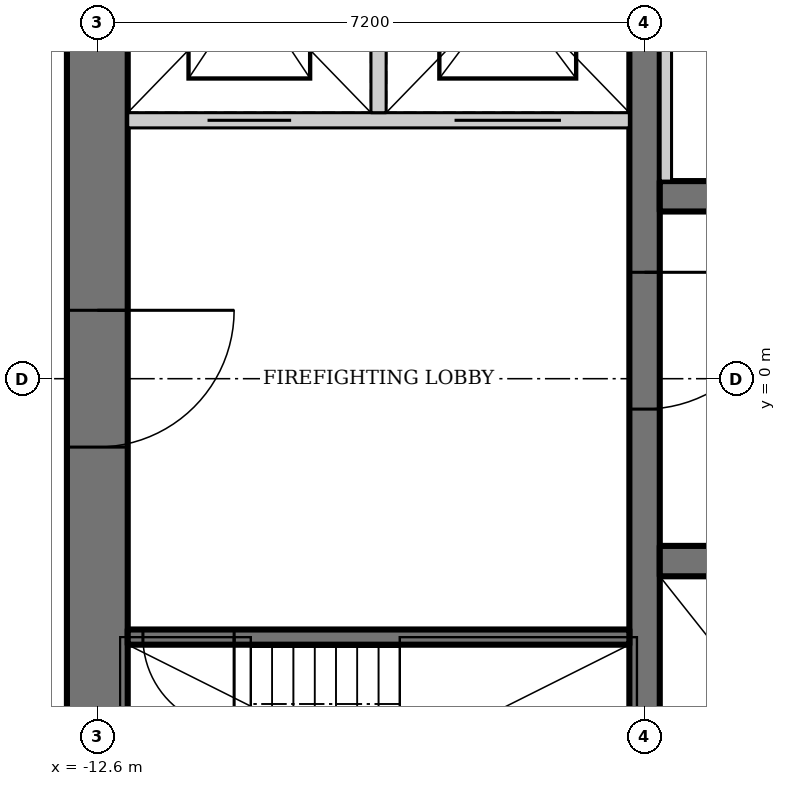
"""IFC4 building model, lengths in metres.
Left out: names, types, materials, properties, quantities, classifications, styles, units other than length and angle.
Written with IfcOpenShell. Run it as: python <this file> out.ifc"""

import sys

from ifc_helpers import new_model, si_unit, direction, frame, frame_2d, origin, place, context, subcontext, project, spatial, rectangle, extrude, element, fill, save


model = new_model("IFC4")
c1 = context("Model", 3, precision=1e-05, world=origin(), true_north=direction((0.0, 1.0)))
c2 = subcontext(c1, "Body", "Model", "MODEL_VIEW")
j1 = project(units=[si_unit("LENGTHUNIT", "METRE"), si_unit("PLANEANGLEUNIT", "RADIAN")], contexts=[c1])
p1 = place(None, origin())
s1 = spatial("IfcSite", under=j1, at=p1, CompositionType="ELEMENT")
p2 = place(p1, origin())
s2 = spatial("IfcBuilding", under=s1, at=p2, CompositionType="ELEMENT")
p3 = place(p2, frame((0.0, 0.0, 279.4)))
s3 = spatial("IfcBuildingStorey", under=s2, at=p3, CompositionType="ELEMENT", Elevation=279.4)
p4 = place(p3, frame((-12.6, 11.0, 0.0), z_axis=(0.0, 0.0, 1.0), x_axis=(0.0, -1.0, 0.0)))
e1 = element("IfcWall", 1, at=p4, inside=s3, PredefinedType="SHEAR", context=c2, shape_type="SweptSolid", body=[
    extrude(rectangle(XDim=22.0, YDim=0.8, at=frame_2d((11.0, 0.0))), origin(), (0.0, 0.0, 1.0), 5.0),
])
p5 = place(p4, frame((10.1, 0.0, 0.0)))
e2 = element("IfcOpeningElement", 2, at=p5, cuts=e1, PredefinedType="OPENING", context=c2, shape_type="SweptSolid", body=[
    extrude(rectangle(XDim=1.8, YDim=2.1, at=frame_2d((0.9, 1.05))), frame((0.0, 0.41, 0.0), z_axis=(0.0, -1.0, 0.0), x_axis=(1.0, 0.0, 0.0)), (0.0, 0.0, 1.0), 0.82),
])
p6 = place(p3, frame((-5.4, 7.8, 0.0), z_axis=(0.0, 0.0, 1.0), x_axis=(0.0, -1.0, 0.0)))
e3 = element("IfcWall", 3, at=p6, inside=s3, PredefinedType="SHEAR", context=c2, shape_type="SweptSolid", body=[
    extrude(rectangle(XDim=14.6, YDim=0.4, at=frame_2d((7.3, 0.0))), origin(), (0.0, 0.0, 1.0), 5.0),
])
p7 = place(p6, frame((6.4, 0.0, 0.0)))
e4 = element("IfcOpeningElement", 4, at=p7, cuts=e3, PredefinedType="OPENING", context=c2, shape_type="SweptSolid", body=[
    extrude(rectangle(XDim=1.8, YDim=2.1, at=frame_2d((0.9, 1.05))), frame((0.0, 0.21, 0.0), z_axis=(0.0, -1.0, 0.0), x_axis=(1.0, 0.0, 0.0)), (0.0, 0.0, 1.0), 0.42),
])
p8 = place(p3, frame((-5.2, -2.4, 0.0), z_axis=(0.0, 0.0, 1.0), x_axis=(1.0, 0.0, 0.0)))
e5 = element("IfcWall", 5, at=p8, inside=s3, PredefinedType="SHEAR", context=c2, shape_type="SweptSolid", body=[
    extrude(rectangle(XDim=10.4, YDim=0.4, at=frame_2d((5.2, 0.0))), origin(), (0.0, 0.0, 1.0), 5.0),
])
p9 = place(p8, frame((1.683, 0.0, 0.0)))
e6 = element("IfcOpeningElement", 6, at=p9, cuts=e5, PredefinedType="OPENING", context=c2, shape_type="SweptSolid", body=[
    extrude(rectangle(XDim=1.1, YDim=2.2, at=frame_2d((0.55, 1.1))), frame((0.0, 0.21, 0.0), z_axis=(0.0, -1.0, 0.0), x_axis=(1.0, 0.0, 0.0)), (0.0, 0.0, 1.0), 0.42),
])
p10 = place(p8, frame((5.217, 0.0, 0.0)))
e7 = element("IfcOpeningElement", 7, at=p10, cuts=e5, PredefinedType="OPENING", context=c2, shape_type="SweptSolid", body=[
    extrude(rectangle(XDim=1.1, YDim=2.2, at=frame_2d((0.55, 1.1))), frame((0.0, 0.21, 0.0), z_axis=(0.0, -1.0, 0.0), x_axis=(1.0, 0.0, 0.0)), (0.0, 0.0, 1.0), 0.42),
])
p11 = place(p8, frame((8.75, 0.0, 0.0)))
e8 = element("IfcOpeningElement", 8, at=p11, cuts=e5, PredefinedType="OPENING", context=c2, shape_type="SweptSolid", body=[
    extrude(rectangle(XDim=1.1, YDim=2.2, at=frame_2d((0.55, 1.1))), frame((0.0, 0.21, 0.0), z_axis=(0.0, -1.0, 0.0), x_axis=(1.0, 0.0, 0.0)), (0.0, 0.0, 1.0), 0.42),
])
p12 = place(p3, frame((5.2, 2.4, 0.0), z_axis=(0.0, 0.0, 1.0), x_axis=(-1.0, 0.0, 0.0)))
e9 = element("IfcWall", 9, at=p12, inside=s3, PredefinedType="SHEAR", context=c2, shape_type="SweptSolid", body=[
    extrude(rectangle(XDim=10.4, YDim=0.4, at=frame_2d((5.2, 0.0))), origin(), (0.0, 0.0, 1.0), 5.0),
])
p13 = place(p3, frame((-5.6, -3.4, 0.0), z_axis=(0.0, 0.0, 1.0), x_axis=(-1.0, 0.0, 0.0)))
e10 = element("IfcWall", 10, at=p13, inside=s3, PredefinedType="SHEAR", context=c2, shape_type="SweptSolid", body=[
    extrude(rectangle(XDim=6.6, YDim=0.2, at=frame_2d((3.3, 0.0))), origin(), (0.0, 0.0, 1.0), 5.0),
])
p14 = place(p13, frame((5.2, 0.0, 0.0)))
e11 = element("IfcOpeningElement", 11, at=p14, cuts=e10, PredefinedType="OPENING", context=c2, shape_type="SweptSolid", body=[
    extrude(rectangle(XDim=1.2, YDim=2.1, at=frame_2d((0.6, 1.05))), frame((0.0, 0.11, 0.0), z_axis=(0.0, -1.0, 0.0), x_axis=(1.0, 0.0, 0.0)), (0.0, 0.0, 1.0), 0.22),
])
p15 = place(p3, frame((-12.2, 3.4, 0.0), z_axis=(0.0, 0.0, 1.0), x_axis=(1.0, 0.0, 0.0)))
e12 = element("IfcWall", 12, at=p15, inside=s3, PredefinedType="SOLIDWALL", context=c2, shape_type="SweptSolid", body=[
    extrude(rectangle(XDim=6.6, YDim=0.2, at=frame_2d((3.3, 0.0))), origin(), (0.0, 0.0, 1.0), 5.0),
])
p16 = place(p15, frame((1.05, 0.0, 0.0)))
e13 = element("IfcOpeningElement", 13, at=p16, cuts=e12, PredefinedType="OPENING", context=c2, shape_type="SweptSolid", body=[
    extrude(rectangle(XDim=1.1, YDim=2.2, at=frame_2d((0.55, 1.1))), frame((0.0, 0.11, 0.0), z_axis=(0.0, -1.0, 0.0), x_axis=(1.0, 0.0, 0.0)), (0.0, 0.0, 1.0), 0.22),
])
p17 = place(p15, frame((4.3, 0.0, 0.0)))
e14 = element("IfcOpeningElement", 14, at=p17, cuts=e12, PredefinedType="OPENING", context=c2, shape_type="SweptSolid", body=[
    extrude(rectangle(XDim=1.4, YDim=2.2, at=frame_2d((0.7, 1.1))), frame((0.0, 0.11, 0.0), z_axis=(0.0, -1.0, 0.0), x_axis=(1.0, 0.0, 0.0)), (0.0, 0.0, 1.0), 0.22),
])
p18 = place(p3, frame((-8.9, 3.5, 0.0), z_axis=(0.0, 0.0, 1.0), x_axis=(0.0, 1.0, 0.0)))
e15 = element("IfcWall", 15, at=p18, inside=s3, PredefinedType="SOLIDWALL", context=c2, shape_type="SweptSolid", body=[
    extrude(rectangle(XDim=3.3, YDim=0.2, at=frame_2d((1.65, 0.0))), origin(), (0.0, 0.0, 1.0), 5.0),
])
p19 = place(p3, frame((-5.12, 2.6, 0.0), z_axis=(0.0, 0.0, 1.0), x_axis=(0.0, 1.0, 0.0)))
e16 = element("IfcWall", 16, at=p19, inside=s3, PredefinedType="PARTITIONING", context=c2, shape_type="SweptSolid", body=[
    extrude(rectangle(XDim=5.2, YDim=0.15, at=frame_2d((2.6, 0.0))), origin(), (0.0, 0.0, 1.0), 4.8),
])
p20 = place(p7, origin())
e17 = element("IfcDoor", 17, at=p20, inside=s3, OperationType="DOUBLE_DOOR_DOUBLE_SWING", PredefinedType="DOOR", context=c2, shape_type="SweptSolid", body=[
    extrude(rectangle(XDim=1.8, YDim=2.1, at=frame_2d((0.9, 1.05))), frame((0.0, 0.025, 0.0), z_axis=(0.0, -1.0, 0.0), x_axis=(1.0, 0.0, 0.0)), (0.0, 0.0, 1.0), 0.05),
])
fill(e4, e17)
p21 = place(p14, origin())
e18 = element("IfcDoor", 18, at=p21, inside=s3, OperationType="SINGLE_SWING_RIGHT", PredefinedType="DOOR", context=c2, shape_type="SweptSolid", body=[
    extrude(rectangle(XDim=1.2, YDim=2.1, at=frame_2d((0.6, 1.05))), frame((0.0, 0.025, 0.0), z_axis=(0.0, -1.0, 0.0), x_axis=(1.0, 0.0, 0.0)), (0.0, 0.0, 1.0), 0.05),
])
fill(e11, e18)
p22 = place(p5, origin())
e19 = element("IfcDoor", 19, at=p22, inside=s3, OperationType="DOUBLE_DOOR_DOUBLE_SWING", PredefinedType="DOOR", context=c2, shape_type="SweptSolid", body=[
    extrude(rectangle(XDim=1.8, YDim=2.1, at=frame_2d((0.9, 1.05))), frame((0.0, 0.025, 0.0), z_axis=(0.0, -1.0, 0.0), x_axis=(1.0, 0.0, 0.0)), (0.0, 0.0, 1.0), 0.05),
])
fill(e2, e19)
p23 = place(p16, origin())
e20 = element("IfcDoor", 20, at=p23, inside=s3, OperationType="DOUBLE_DOOR_SLIDING", PredefinedType="DOOR", context=c2, shape_type="SweptSolid", body=[
    extrude(rectangle(XDim=1.1, YDim=2.2, at=frame_2d((0.55, 1.1))), frame((0.0, 0.025, 0.0), z_axis=(0.0, -1.0, 0.0), x_axis=(1.0, 0.0, 0.0)), (0.0, 0.0, 1.0), 0.05),
])
fill(e13, e20)
p24 = place(p17, origin())
e21 = element("IfcDoor", 21, at=p24, inside=s3, OperationType="DOUBLE_DOOR_SLIDING", PredefinedType="DOOR", context=c2, shape_type="SweptSolid", body=[
    extrude(rectangle(XDim=1.4, YDim=2.2, at=frame_2d((0.7, 1.1))), frame((0.0, 0.025, 0.0), z_axis=(0.0, -1.0, 0.0), x_axis=(1.0, 0.0, 0.0)), (0.0, 0.0, 1.0), 0.05),
])
fill(e14, e21)
save(model, sys.argv[1])
